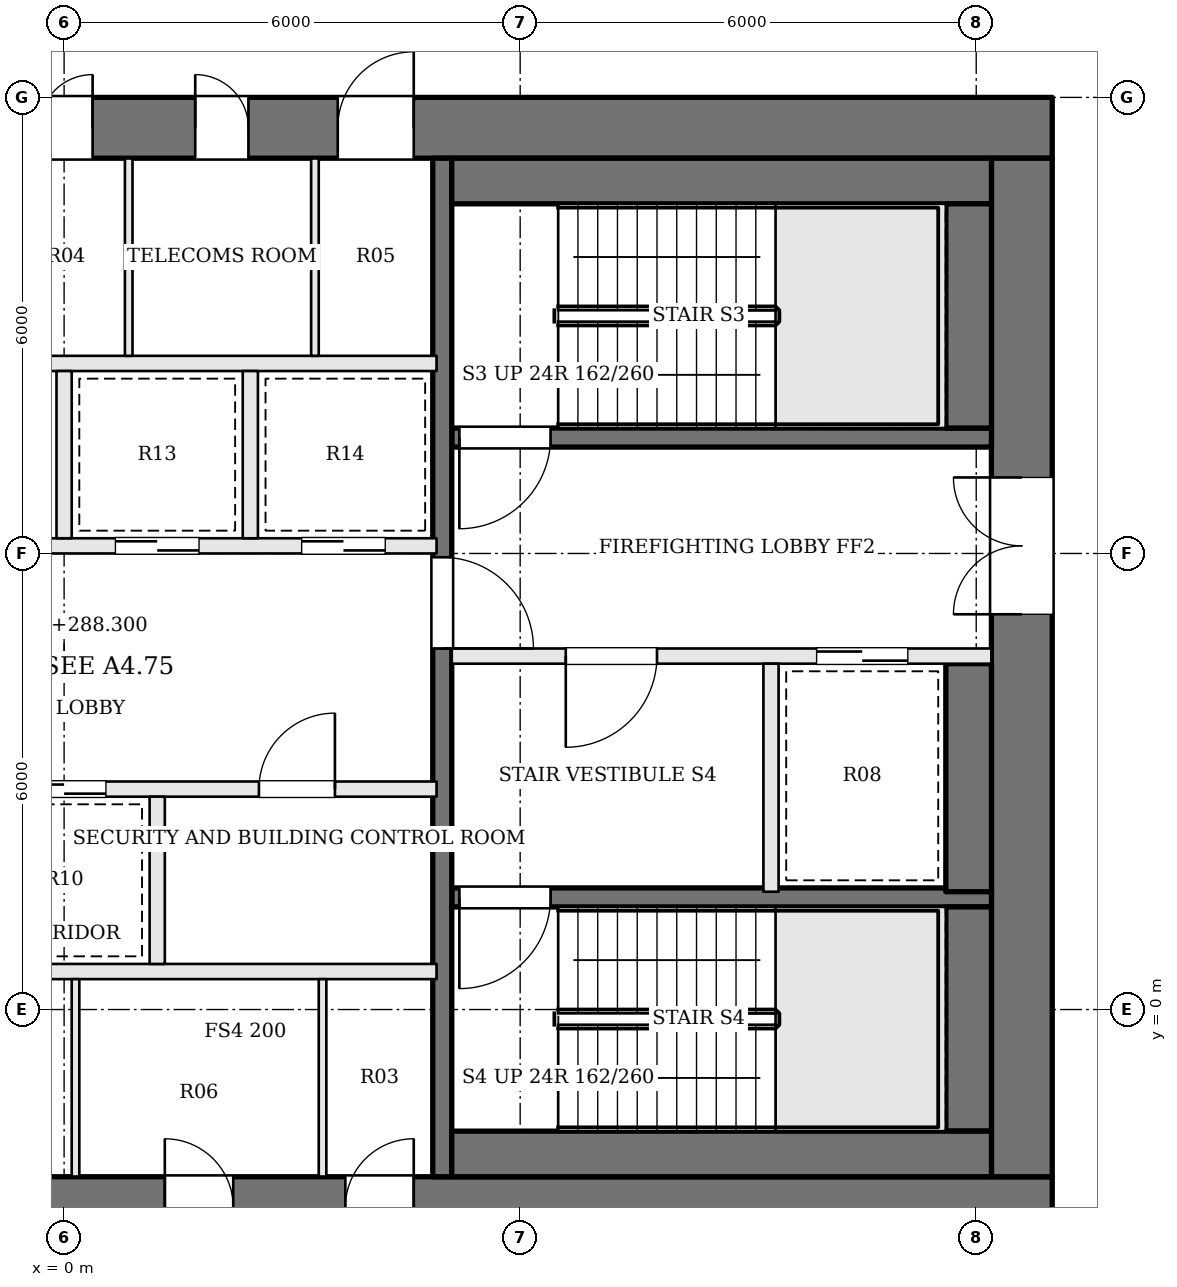
"""IFC4 building model, lengths in metres.
Left out: names, types, materials, properties, quantities, classifications, styles, units other than length and angle.
Written with IfcOpenShell. Run it as: python <this file> out.ifc"""

import sys

from ifc_helpers import new_model, si_unit, direction, frame, frame_2d, origin, place, context, subcontext, project, spatial, rectangle, extrude, element, fill, save


model = new_model("IFC4")
c1 = context("Model", 3, precision=1e-05, world=origin(), true_north=direction((0.0, 1.0)))
c2 = subcontext(c1, "Body", "Model", "MODEL_VIEW")
j1 = project(units=[si_unit("LENGTHUNIT", "METRE"), si_unit("PLANEANGLEUNIT", "RADIAN")], contexts=[c1])
p1 = place(None, origin())
s1 = spatial("IfcSite", under=j1, at=p1, CompositionType="ELEMENT")
p2 = place(p1, origin())
s2 = spatial("IfcBuilding", under=s1, at=p2, CompositionType="ELEMENT")
p3 = place(p2, frame((0.0, 0.0, 288.3)))
s3 = spatial("IfcBuildingStorey", under=s2, at=p3, CompositionType="ELEMENT", Elevation=288.3)
p4 = place(p3, frame((-13.0, 11.6, 0.0), z_axis=(0.0, 0.0, 1.0), x_axis=(1.0, 0.0, 0.0)))
e1 = element("IfcWall", 1, at=p4, inside=s3, PredefinedType="SHEAR", context=c2, shape_type="SweptSolid", body=[
    extrude(rectangle(XDim=26.0, YDim=0.8, at=frame_2d((13.0, 0.0))), origin(), (0.0, 0.0, 1.0), 3.9),
])
p5 = place(p4, frame((9.65, 0.0, 0.0)))
e2 = element("IfcOpeningElement", 2, at=p5, cuts=e1, PredefinedType="OPENING", context=c2, shape_type="SweptSolid", body=[
    extrude(rectangle(XDim=1.0, YDim=2.1, at=frame_2d((0.5, 1.05))), frame((0.0, 0.41, 0.0), z_axis=(0.0, -1.0, 0.0), x_axis=(1.0, 0.0, 0.0)), (0.0, 0.0, 1.0), 0.82),
])
p6 = place(p4, frame((12.675, 0.0, 0.0)))
e3 = element("IfcOpeningElement", 3, at=p6, cuts=e1, PredefinedType="OPENING", context=c2, shape_type="SweptSolid", body=[
    extrude(rectangle(XDim=0.7, YDim=2.1, at=frame_2d((0.35, 1.05))), frame((0.0, 0.41, 0.0), z_axis=(0.0, -1.0, 0.0), x_axis=(1.0, 0.0, 0.0)), (0.0, 0.0, 1.0), 0.82),
])
p7 = place(p4, frame((14.725, 0.0, 0.0)))
e4 = element("IfcOpeningElement", 4, at=p7, cuts=e1, PredefinedType="OPENING", context=c2, shape_type="SweptSolid", body=[
    extrude(rectangle(XDim=0.7, YDim=2.1, at=frame_2d((0.35, 1.05))), frame((0.0, 0.41, 0.0), z_axis=(0.0, -1.0, 0.0), x_axis=(1.0, 0.0, 0.0)), (0.0, 0.0, 1.0), 0.82),
])
p8 = place(p4, frame((16.6, 0.0, 0.0)))
e5 = element("IfcOpeningElement", 5, at=p8, cuts=e1, PredefinedType="OPENING", context=c2, shape_type="SweptSolid", body=[
    extrude(rectangle(XDim=1.0, YDim=2.1, at=frame_2d((0.5, 1.05))), frame((0.0, 0.41, 0.0), z_axis=(0.0, -1.0, 0.0), x_axis=(1.0, 0.0, 0.0)), (0.0, 0.0, 1.0), 0.82),
])
p9 = place(p3, frame((-13.0, -2.6, 0.0), z_axis=(0.0, 0.0, 1.0), x_axis=(1.0, 0.0, 0.0)))
e6 = element("IfcWall", 6, at=p9, inside=s3, PredefinedType="SHEAR", context=c2, shape_type="SweptSolid", body=[
    extrude(rectangle(XDim=26.0, YDim=0.8, at=frame_2d((13.0, 0.0))), origin(), (0.0, 0.0, 1.0), 3.9),
])
p10 = place(p9, frame((9.275, 0.0, 0.0)))
e7 = element("IfcOpeningElement", 7, at=p10, cuts=e6, PredefinedType="OPENING", context=c2, shape_type="SweptSolid", body=[
    extrude(rectangle(XDim=0.9, YDim=2.1, at=frame_2d((0.45, 1.05))), frame((0.0, 0.41, 0.0), z_axis=(0.0, -1.0, 0.0), x_axis=(1.0, 0.0, 0.0)), (0.0, 0.0, 1.0), 0.82),
])
p11 = place(p9, frame((11.75, 0.0, 0.0)))
e8 = element("IfcOpeningElement", 8, at=p11, cuts=e6, PredefinedType="OPENING", context=c2, shape_type="SweptSolid", body=[
    extrude(rectangle(XDim=1.0, YDim=2.1, at=frame_2d((0.5, 1.05))), frame((0.0, 0.41, 0.0), z_axis=(0.0, -1.0, 0.0), x_axis=(1.0, 0.0, 0.0)), (0.0, 0.0, 1.0), 0.82),
])
p12 = place(p9, frame((14.325, 0.0, 0.0)))
e9 = element("IfcOpeningElement", 9, at=p12, cuts=e6, PredefinedType="OPENING", context=c2, shape_type="SweptSolid", body=[
    extrude(rectangle(XDim=0.9, YDim=2.1, at=frame_2d((0.45, 1.05))), frame((0.0, 0.41, 0.0), z_axis=(0.0, -1.0, 0.0), x_axis=(1.0, 0.0, 0.0)), (0.0, 0.0, 1.0), 0.82),
])
p13 = place(p9, frame((16.7, 0.0, 0.0)))
e10 = element("IfcOpeningElement", 10, at=p13, cuts=e6, PredefinedType="OPENING", context=c2, shape_type="SweptSolid", body=[
    extrude(rectangle(XDim=0.9, YDim=2.1, at=frame_2d((0.45, 1.05))), frame((0.0, 0.41, 0.0), z_axis=(0.0, -1.0, 0.0), x_axis=(1.0, 0.0, 0.0)), (0.0, 0.0, 1.0), 0.82),
])
p14 = place(p3, frame((12.6, -2.2, 0.0), z_axis=(0.0, 0.0, 1.0), x_axis=(0.0, 1.0, 0.0)))
e11 = element("IfcWall", 11, at=p14, inside=s3, PredefinedType="SHEAR", context=c2, shape_type="SweptSolid", body=[
    extrude(rectangle(XDim=13.4, YDim=0.8, at=frame_2d((6.7, 0.0))), origin(), (0.0, 0.0, 1.0), 3.9),
])
p15 = place(p14, frame((7.4, 0.0, 0.0)))
e12 = element("IfcOpeningElement", 12, at=p15, cuts=e11, PredefinedType="OPENING", context=c2, shape_type="SweptSolid", body=[
    extrude(rectangle(XDim=1.8, YDim=2.1, at=frame_2d((0.9, 1.05))), frame((0.0, 0.41, 0.0), z_axis=(0.0, -1.0, 0.0), x_axis=(1.0, 0.0, 0.0)), (0.0, 0.0, 1.0), 0.82),
])
p16 = place(p3, frame((12.2, 7.525, 0.0), z_axis=(0.0, 0.0, 1.0), x_axis=(-1.0, 0.0, 0.0)))
e13 = element("IfcWall", 13, at=p16, inside=s3, PredefinedType="SOLIDWALL", context=c2, shape_type="SweptSolid", body=[
    extrude(rectangle(XDim=7.1, YDim=0.25, at=frame_2d((3.55, 0.0))), origin(), (0.0, 0.0, 1.0), 3.7),
])
p17 = place(p16, frame((5.8, 0.0, 0.0)))
e14 = element("IfcOpeningElement", 14, at=p17, cuts=e13, PredefinedType="OPENING", context=c2, shape_type="SweptSolid", body=[
    extrude(rectangle(XDim=1.2, YDim=2.1, at=frame_2d((0.6, 1.05))), frame((0.0, 0.135, 0.0), z_axis=(0.0, -1.0, 0.0), x_axis=(1.0, 0.0, 0.0)), (0.0, 0.0, 1.0), 0.27),
])
p18 = place(p3, frame((12.2, 4.65, 0.0), z_axis=(0.0, 0.0, 1.0), x_axis=(-1.0, 0.0, 0.0)))
e15 = element("IfcWall", 15, at=p18, inside=s3, PredefinedType="SOLIDWALL", context=c2, shape_type="SweptSolid", body=[
    extrude(rectangle(XDim=7.1, YDim=0.2, at=frame_2d((3.55, 0.0))), origin(), (0.0, 0.0, 1.0), 3.7),
])
p19 = place(p18, frame((4.4, 0.0, 0.0)))
e16 = element("IfcOpeningElement", 16, at=p19, cuts=e15, PredefinedType="OPENING", context=c2, shape_type="SweptSolid", body=[
    extrude(rectangle(XDim=1.2, YDim=2.1, at=frame_2d((0.6, 1.05))), frame((0.0, 0.11, 0.0), z_axis=(0.0, -1.0, 0.0), x_axis=(1.0, 0.0, 0.0)), (0.0, 0.0, 1.0), 0.22),
])
p20 = place(p18, frame((1.1, 0.0, 0.0)))
e17 = element("IfcOpeningElement", 17, at=p20, cuts=e15, PredefinedType="OPENING", context=c2, shape_type="SweptSolid", body=[
    extrude(rectangle(XDim=1.2, YDim=2.1, at=frame_2d((0.6, 1.05))), frame((0.0, 0.11, 0.0), z_axis=(0.0, -1.0, 0.0), x_axis=(1.0, 0.0, 0.0)), (0.0, 0.0, 1.0), 0.22),
])
p21 = place(p3, frame((12.2, 1.475, 0.0), z_axis=(0.0, 0.0, 1.0), x_axis=(-1.0, 0.0, 0.0)))
e18 = element("IfcWall", 18, at=p21, inside=s3, PredefinedType="SOLIDWALL", context=c2, shape_type="SweptSolid", body=[
    extrude(rectangle(XDim=7.1, YDim=0.25, at=frame_2d((3.55, 0.0))), origin(), (0.0, 0.0, 1.0), 3.7),
])
p22 = place(p21, frame((5.8, 0.0, 0.0)))
e19 = element("IfcOpeningElement", 19, at=p22, cuts=e18, PredefinedType="OPENING", context=c2, shape_type="SweptSolid", body=[
    extrude(rectangle(XDim=1.2, YDim=2.1, at=frame_2d((0.6, 1.05))), frame((0.0, 0.135, 0.0), z_axis=(0.0, -1.0, 0.0), x_axis=(1.0, 0.0, 0.0)), (0.0, 0.0, 1.0), 0.27),
])
p23 = place(p3, frame((9.3, 4.55, 0.0), z_axis=(0.0, 0.0, 1.0), x_axis=(0.0, -1.0, 0.0)))
e20 = element("IfcWall", 20, at=p23, inside=s3, PredefinedType="SOLIDWALL", context=c2, shape_type="SweptSolid", body=[
    extrude(rectangle(XDim=3.0, YDim=0.2, at=frame_2d((1.5, 0.0))), origin(), (0.0, 0.0, 1.0), 3.7),
])
p24 = place(p3, frame((4.975, 11.2, 0.0), z_axis=(0.0, 0.0, 1.0), x_axis=(0.0, -1.0, 0.0)))
e21 = element("IfcWall", 21, at=p24, inside=s3, PredefinedType="SOLIDWALL", context=c2, shape_type="SweptSolid", body=[
    extrude(rectangle(XDim=13.4, YDim=0.25, at=frame_2d((6.7, 0.0))), origin(), (0.0, 0.0, 1.0), 3.7),
])
p25 = place(p24, frame((5.25, 0.0, 0.0)))
e22 = element("IfcOpeningElement", 22, at=p25, cuts=e21, PredefinedType="OPENING", context=c2, shape_type="SweptSolid", body=[
    extrude(rectangle(XDim=1.2, YDim=2.1, at=frame_2d((0.6, 1.05))), frame((0.0, 0.135, 0.0), z_axis=(0.0, -1.0, 0.0), x_axis=(1.0, 0.0, 0.0)), (0.0, 0.0, 1.0), 0.27),
])
p26 = place(p3, frame((12.2, 10.9, 0.0), z_axis=(0.0, 0.0, 1.0), x_axis=(-1.0, 0.0, 0.0)))
e23 = element("IfcWall", 23, at=p26, inside=s3, PredefinedType="SOLIDWALL", context=c2, shape_type="SweptSolid", body=[
    extrude(rectangle(XDim=7.1, YDim=0.6, at=frame_2d((3.55, 0.0))), origin(), (0.0, 0.0, 1.0), 3.7),
])
p27 = place(p3, frame((11.9, 10.6, 0.0), z_axis=(0.0, 0.0, 1.0), x_axis=(0.0, -1.0, 0.0)))
e24 = element("IfcWall", 24, at=p27, inside=s3, PredefinedType="SOLIDWALL", context=c2, shape_type="SweptSolid", body=[
    extrude(rectangle(XDim=2.95, YDim=0.6, at=frame_2d((1.475, 0.0))), origin(), (0.0, 0.0, 1.0), 3.7),
])
p28 = place(p3, frame((11.9, 4.55, 0.0), z_axis=(0.0, 0.0, 1.0), x_axis=(0.0, -1.0, 0.0)))
e25 = element("IfcWall", 25, at=p28, inside=s3, PredefinedType="SOLIDWALL", context=c2, shape_type="SweptSolid", body=[
    extrude(rectangle(XDim=3.0, YDim=0.6, at=frame_2d((1.5, 0.0))), origin(), (0.0, 0.0, 1.0), 3.7),
])
p29 = place(p3, frame((11.9, 1.35, 0.0), z_axis=(0.0, 0.0, 1.0), x_axis=(0.0, -1.0, 0.0)))
e26 = element("IfcWall", 26, at=p29, inside=s3, PredefinedType="SOLIDWALL", context=c2, shape_type="SweptSolid", body=[
    extrude(rectangle(XDim=2.95, YDim=0.6, at=frame_2d((1.475, 0.0))), origin(), (0.0, 0.0, 1.0), 3.7),
])
p30 = place(p3, frame((12.2, -1.9, 0.0), z_axis=(0.0, 0.0, 1.0), x_axis=(-1.0, 0.0, 0.0)))
e27 = element("IfcWall", 27, at=p30, inside=s3, PredefinedType="SOLIDWALL", context=c2, shape_type="SweptSolid", body=[
    extrude(rectangle(XDim=7.1, YDim=0.6, at=frame_2d((3.55, 0.0))), origin(), (0.0, 0.0, 1.0), 3.7),
])
p31 = place(p3, frame((-4.9, 0.5, 0.0), z_axis=(0.0, 0.0, 1.0), x_axis=(1.0, 0.0, 0.0)))
e28 = element("IfcWall", 28, at=p31, inside=s3, PredefinedType="SOLIDWALL", context=c2, shape_type="SweptSolid", body=[
    extrude(rectangle(XDim=9.8, YDim=0.2, at=frame_2d((4.9, 0.0))), origin(), (0.0, 0.0, 1.0), 3.7),
])
p32 = place(p3, frame((-4.9, 2.9, 0.0), z_axis=(0.0, 0.0, 1.0), x_axis=(1.0, 0.0, 0.0)))
e29 = element("IfcWall", 29, at=p32, inside=s3, PredefinedType="SOLIDWALL", context=c2, shape_type="SweptSolid", body=[
    extrude(rectangle(XDim=9.8, YDim=0.2, at=frame_2d((4.9, 0.0))), origin(), (0.0, 0.0, 1.0), 3.7),
])
p33 = place(p32, frame((0.675, 0.0, 0.0)))
e30 = element("IfcOpeningElement", 30, at=p33, cuts=e29, PredefinedType="OPENING", context=c2, shape_type="SweptSolid", body=[
    extrude(rectangle(XDim=1.1, YDim=2.1, at=frame_2d((0.55, 1.05))), frame((0.0, 0.11, 0.0), z_axis=(0.0, -1.0, 0.0), x_axis=(1.0, 0.0, 0.0)), (0.0, 0.0, 1.0), 0.22),
])
p34 = place(p32, frame((2.613, 0.0, 0.0)))
e31 = element("IfcOpeningElement", 31, at=p34, cuts=e29, PredefinedType="OPENING", context=c2, shape_type="SweptSolid", body=[
    extrude(rectangle(XDim=0.9, YDim=2.1, at=frame_2d((0.45, 1.05))), frame((0.0, 0.11, 0.0), z_axis=(0.0, -1.0, 0.0), x_axis=(1.0, 0.0, 0.0)), (0.0, 0.0, 1.0), 0.22),
])
p35 = place(p32, frame((4.35, 0.0, 0.0)))
e32 = element("IfcOpeningElement", 32, at=p35, cuts=e29, PredefinedType="OPENING", context=c2, shape_type="SweptSolid", body=[
    extrude(rectangle(XDim=1.1, YDim=2.1, at=frame_2d((0.55, 1.05))), frame((0.0, 0.11, 0.0), z_axis=(0.0, -1.0, 0.0), x_axis=(1.0, 0.0, 0.0)), (0.0, 0.0, 1.0), 0.22),
])
p36 = place(p32, frame((7.463, 0.0, 0.0)))
e33 = element("IfcOpeningElement", 33, at=p36, cuts=e29, PredefinedType="OPENING", context=c2, shape_type="SweptSolid", body=[
    extrude(rectangle(XDim=1.0, YDim=2.1, at=frame_2d((0.5, 1.05))), frame((0.0, 0.11, 0.0), z_axis=(0.0, -1.0, 0.0), x_axis=(1.0, 0.0, 0.0)), (0.0, 0.0, 1.0), 0.22),
])
p37 = place(p3, frame((-4.9, 6.1, 0.0), z_axis=(0.0, 0.0, 1.0), x_axis=(1.0, 0.0, 0.0)))
e34 = element("IfcWall", 34, at=p37, inside=s3, PredefinedType="SOLIDWALL", context=c2, shape_type="SweptSolid", body=[
    extrude(rectangle(XDim=9.8, YDim=0.2, at=frame_2d((4.9, 0.0))), origin(), (0.0, 0.0, 1.0), 3.7),
])
p38 = place(p37, frame((0.675, 0.0, 0.0)))
e35 = element("IfcOpeningElement", 35, at=p38, cuts=e34, PredefinedType="OPENING", context=c2, shape_type="SweptSolid", body=[
    extrude(rectangle(XDim=1.1, YDim=2.1, at=frame_2d((0.55, 1.05))), frame((0.0, 0.11, 0.0), z_axis=(0.0, -1.0, 0.0), x_axis=(1.0, 0.0, 0.0)), (0.0, 0.0, 1.0), 0.22),
])
p39 = place(p37, frame((3.125, 0.0, 0.0)))
e36 = element("IfcOpeningElement", 36, at=p39, cuts=e34, PredefinedType="OPENING", context=c2, shape_type="SweptSolid", body=[
    extrude(rectangle(XDim=1.1, YDim=2.1, at=frame_2d((0.55, 1.05))), frame((0.0, 0.11, 0.0), z_axis=(0.0, -1.0, 0.0), x_axis=(1.0, 0.0, 0.0)), (0.0, 0.0, 1.0), 0.22),
])
p40 = place(p37, frame((5.575, 0.0, 0.0)))
e37 = element("IfcOpeningElement", 37, at=p40, cuts=e34, PredefinedType="OPENING", context=c2, shape_type="SweptSolid", body=[
    extrude(rectangle(XDim=1.1, YDim=2.1, at=frame_2d((0.55, 1.05))), frame((0.0, 0.11, 0.0), z_axis=(0.0, -1.0, 0.0), x_axis=(1.0, 0.0, 0.0)), (0.0, 0.0, 1.0), 0.22),
])
p41 = place(p37, frame((8.025, 0.0, 0.0)))
e38 = element("IfcOpeningElement", 38, at=p41, cuts=e34, PredefinedType="OPENING", context=c2, shape_type="SweptSolid", body=[
    extrude(rectangle(XDim=1.1, YDim=2.1, at=frame_2d((0.55, 1.05))), frame((0.0, 0.11, 0.0), z_axis=(0.0, -1.0, 0.0), x_axis=(1.0, 0.0, 0.0)), (0.0, 0.0, 1.0), 0.22),
])
p42 = place(p3, frame((-4.9, 8.5, 0.0), z_axis=(0.0, 0.0, 1.0), x_axis=(1.0, 0.0, 0.0)))
e39 = element("IfcWall", 39, at=p42, inside=s3, PredefinedType="SOLIDWALL", context=c2, shape_type="SweptSolid", body=[
    extrude(rectangle(XDim=9.8, YDim=0.2, at=frame_2d((4.9, 0.0))), origin(), (0.0, 0.0, 1.0), 3.7),
])
for number, where, z_axis, x_axis in (
    (40, (1.225, 0.6, 0.0), (0.0, 0.0, 1.0), (0.0, 1.0, 0.0)),
    (41, (0.0, 6.2, 0.0), (0.0, 0.0, 1.0), (0.0, 1.0, 0.0)),
    (42, (2.45, 6.2, 0.0), (0.0, 0.0, 1.0), (0.0, 1.0, 0.0)),
):
    element("IfcWall", number, at=place(p3, frame(where, z_axis=z_axis, x_axis=x_axis)), inside=s3, PredefinedType="SOLIDWALL", context=c2, shape_type="SweptSolid", body=[
        extrude(rectangle(XDim=2.2, YDim=0.2, at=frame_2d((1.1, 0.0))), origin(), (0.0, 0.0, 1.0), 3.7),
    ])
for number, where, z_axis, x_axis in (
    (43, (0.15, -2.2, 0.0), (0.0, 0.0, 1.0), (0.0, 1.0, 0.0)),
    (44, (3.4, -2.2, 0.0), (0.0, 0.0, 1.0), (0.0, 1.0, 0.0)),
    (45, (0.85, 8.6, 0.0), (0.0, 0.0, 1.0), (0.0, 1.0, 0.0)),
    (46, (3.3, 8.6, 0.0), (0.0, 0.0, 1.0), (0.0, 1.0, 0.0)),
):
    element("IfcWall", number, at=place(p3, frame(where, z_axis=z_axis, x_axis=x_axis)), inside=s3, PredefinedType="PARTITIONING", context=c2, shape_type="SweptSolid", body=[
        extrude(rectangle(XDim=2.6, YDim=0.1, at=frame_2d((1.3, 0.0))), origin(), (0.0, 0.0, 1.0), 3.7),
    ])
p43 = place(p15, origin())
e47 = element("IfcDoor", 47, at=p43, inside=s3, OperationType="DOUBLE_DOOR_SINGLE_SWING", PredefinedType="DOOR", context=c2, shape_type="SweptSolid", body=[
    extrude(rectangle(XDim=1.8, YDim=2.1, at=frame_2d((0.9, 1.05))), frame((0.0, 0.025, 0.0), z_axis=(0.0, -1.0, 0.0), x_axis=(1.0, 0.0, 0.0)), (0.0, 0.0, 1.0), 0.05),
])
fill(e12, e47)
p44 = place(p25, origin())
e48 = element("IfcDoor", 48, at=p44, inside=s3, OperationType="SINGLE_SWING_RIGHT", PredefinedType="DOOR", context=c2, shape_type="SweptSolid", body=[
    extrude(rectangle(XDim=1.2, YDim=2.1, at=frame_2d((0.6, 1.05))), frame((0.0, 0.025, 0.0), z_axis=(0.0, -1.0, 0.0), x_axis=(1.0, 0.0, 0.0)), (0.0, 0.0, 1.0), 0.05),
])
fill(e22, e48)
p45 = place(p19, origin())
e49 = element("IfcDoor", 49, at=p45, inside=s3, OperationType="SINGLE_SWING_RIGHT", PredefinedType="DOOR", context=c2, shape_type="SweptSolid", body=[
    extrude(rectangle(XDim=1.2, YDim=2.1, at=frame_2d((0.6, 1.05))), frame((0.0, 0.025, 0.0), z_axis=(0.0, -1.0, 0.0), x_axis=(1.0, 0.0, 0.0)), (0.0, 0.0, 1.0), 0.05),
])
fill(e16, e49)
p46 = place(p17, origin())
e50 = element("IfcDoor", 50, at=p46, inside=s3, OperationType="SINGLE_SWING_RIGHT", PredefinedType="DOOR", context=c2, shape_type="SweptSolid", body=[
    extrude(rectangle(XDim=1.2, YDim=2.1, at=frame_2d((0.6, 1.05))), frame((0.0, 0.025, 0.0), z_axis=(0.0, -1.0, 0.0), x_axis=(1.0, 0.0, 0.0)), (0.0, 0.0, 1.0), 0.05),
])
fill(e14, e50)
p47 = place(p22, origin())
e51 = element("IfcDoor", 51, at=p47, inside=s3, OperationType="SINGLE_SWING_RIGHT", PredefinedType="DOOR", context=c2, shape_type="SweptSolid", body=[
    extrude(rectangle(XDim=1.2, YDim=2.1, at=frame_2d((0.6, 1.05))), frame((0.0, 0.025, 0.0), z_axis=(0.0, -1.0, 0.0), x_axis=(1.0, 0.0, 0.0)), (0.0, 0.0, 1.0), 0.05),
])
fill(e19, e51)
p48 = place(p20, origin())
e52 = element("IfcDoor", 52, at=p48, inside=s3, OperationType="SLIDING_TO_RIGHT", PredefinedType="DOOR", context=c2, shape_type="SweptSolid", body=[
    extrude(rectangle(XDim=1.2, YDim=2.1, at=frame_2d((0.6, 1.05))), frame((0.0, 0.025, 0.0), z_axis=(0.0, -1.0, 0.0), x_axis=(1.0, 0.0, 0.0)), (0.0, 0.0, 1.0), 0.05),
])
fill(e17, e52)
p49 = place(p35, origin())
e53 = element("IfcDoor", 53, at=p49, inside=s3, OperationType="SLIDING_TO_LEFT", PredefinedType="DOOR", context=c2, shape_type="SweptSolid", body=[
    extrude(rectangle(XDim=1.1, YDim=2.1, at=frame_2d((0.55, 1.05))), frame((0.0, 0.025, 0.0), z_axis=(0.0, -1.0, 0.0), x_axis=(1.0, 0.0, 0.0)), (0.0, 0.0, 1.0), 0.05),
])
fill(e32, e53)
p50 = place(p36, origin())
e54 = element("IfcDoor", 54, at=p50, inside=s3, OperationType="SINGLE_SWING_RIGHT", PredefinedType="DOOR", context=c2, shape_type="SweptSolid", body=[
    extrude(rectangle(XDim=1.0, YDim=2.1, at=frame_2d((0.5, 1.05))), frame((0.0, 0.025, 0.0), z_axis=(0.0, -1.0, 0.0), x_axis=(1.0, 0.0, 0.0)), (0.0, 0.0, 1.0), 0.05),
])
fill(e33, e54)
p51 = place(p40, origin())
e55 = element("IfcDoor", 55, at=p51, inside=s3, OperationType="SLIDING_TO_RIGHT", PredefinedType="DOOR", context=c2, shape_type="SweptSolid", body=[
    extrude(rectangle(XDim=1.1, YDim=2.1, at=frame_2d((0.55, 1.05))), frame((0.0, 0.025, 0.0), z_axis=(0.0, -1.0, 0.0), x_axis=(1.0, 0.0, 0.0)), (0.0, 0.0, 1.0), 0.05),
])
fill(e37, e55)
p52 = place(p41, origin())
e56 = element("IfcDoor", 56, at=p52, inside=s3, OperationType="SLIDING_TO_LEFT", PredefinedType="DOOR", context=c2, shape_type="SweptSolid", body=[
    extrude(rectangle(XDim=1.1, YDim=2.1, at=frame_2d((0.55, 1.05))), frame((0.0, 0.025, 0.0), z_axis=(0.0, -1.0, 0.0), x_axis=(1.0, 0.0, 0.0)), (0.0, 0.0, 1.0), 0.05),
])
fill(e38, e56)
p53 = place(p12, origin())
e57 = element("IfcDoor", 57, at=p53, inside=s3, OperationType="SINGLE_SWING_LEFT", PredefinedType="DOOR", context=c2, shape_type="SweptSolid", body=[
    extrude(rectangle(XDim=0.9, YDim=2.1, at=frame_2d((0.45, 1.05))), frame((0.0, 0.025, 0.0), z_axis=(0.0, -1.0, 0.0), x_axis=(1.0, 0.0, 0.0)), (0.0, 0.0, 1.0), 0.05),
])
fill(e9, e57)
p54 = place(p13, origin())
e58 = element("IfcDoor", 58, at=p54, inside=s3, OperationType="SINGLE_SWING_RIGHT", PredefinedType="DOOR", context=c2, shape_type="SweptSolid", body=[
    extrude(rectangle(XDim=0.9, YDim=2.1, at=frame_2d((0.45, 1.05))), frame((0.0, 0.025, 0.0), z_axis=(0.0, -1.0, 0.0), x_axis=(1.0, 0.0, 0.0)), (0.0, 0.0, 1.0), 0.05),
])
fill(e10, e58)
p55 = place(p6, origin())
e59 = element("IfcDoor", 59, at=p55, inside=s3, OperationType="SINGLE_SWING_RIGHT", PredefinedType="DOOR", context=c2, shape_type="SweptSolid", body=[
    extrude(rectangle(XDim=0.7, YDim=2.1, at=frame_2d((0.35, 1.05))), frame((0.0, 0.025, 0.0), z_axis=(0.0, -1.0, 0.0), x_axis=(1.0, 0.0, 0.0)), (0.0, 0.0, 1.0), 0.05),
])
fill(e3, e59)
p56 = place(p7, origin())
e60 = element("IfcDoor", 60, at=p56, inside=s3, OperationType="SINGLE_SWING_LEFT", PredefinedType="DOOR", context=c2, shape_type="SweptSolid", body=[
    extrude(rectangle(XDim=0.7, YDim=2.1, at=frame_2d((0.35, 1.05))), frame((0.0, 0.025, 0.0), z_axis=(0.0, -1.0, 0.0), x_axis=(1.0, 0.0, 0.0)), (0.0, 0.0, 1.0), 0.05),
])
fill(e4, e60)
p57 = place(p8, origin())
e61 = element("IfcDoor", 61, at=p57, inside=s3, OperationType="SINGLE_SWING_RIGHT", PredefinedType="DOOR", context=c2, shape_type="SweptSolid", body=[
    extrude(rectangle(XDim=1.0, YDim=2.1, at=frame_2d((0.5, 1.05))), frame((0.0, 0.025, 0.0), z_axis=(0.0, -1.0, 0.0), x_axis=(1.0, 0.0, 0.0)), (0.0, 0.0, 1.0), 0.05),
])
fill(e5, e61)
save(model, sys.argv[1])
